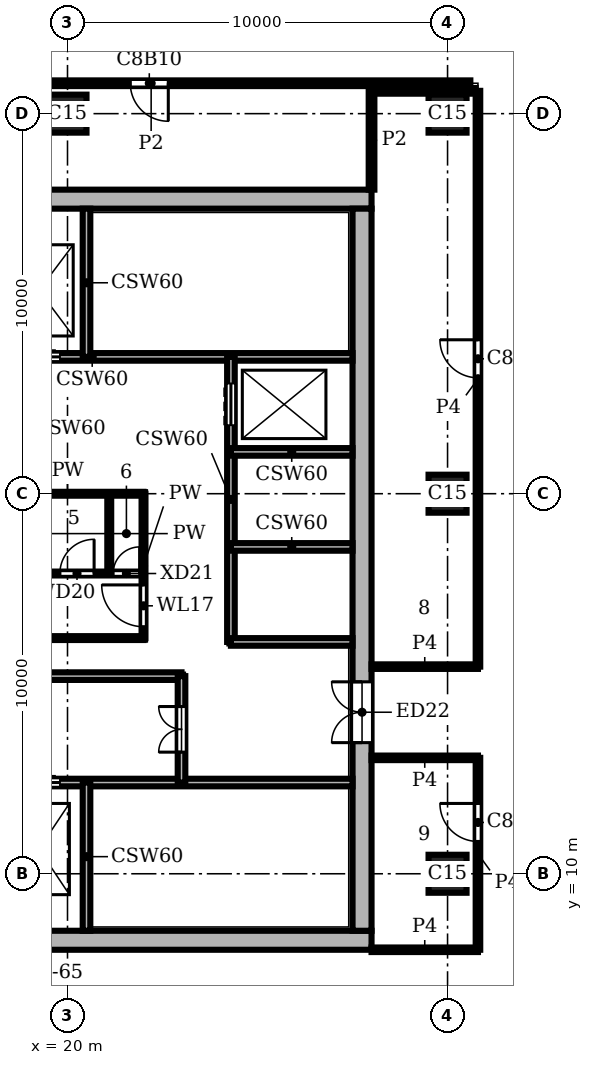
"""IFC4 building model, lengths in metres.
Left out: names, types, materials, properties, quantities, classifications, styles, units other than length and angle.
Written with IfcOpenShell. Run it as: python <this file> out.ifc"""

import sys

from ifc_helpers import new_model, si_unit, direction, frame, frame_2d, origin, origin_2d, place, context, subcontext, project, spatial, rectangle, extrude, element, fill, save


model = new_model("IFC4")
c1 = context("Model", 3, precision=1e-05, world=origin(), true_north=direction((0.0, 1.0)))
c2 = subcontext(c1, "Body", "Model", "MODEL_VIEW")
j1 = project(units=[si_unit("LENGTHUNIT", "METRE"), si_unit("PLANEANGLEUNIT", "RADIAN")], contexts=[c1])
p1 = place(None, origin())
s1 = spatial("IfcSite", under=j1, at=p1, CompositionType="ELEMENT")
p2 = place(p1, origin())
s2 = spatial("IfcBuilding", under=s1, at=p2, CompositionType="ELEMENT")
p3 = place(p2, frame((0.0, 0.0, 329.4)))
s3 = spatial("IfcBuildingStorey", under=s2, at=p3, CompositionType="ELEMENT", Elevation=329.4)
for number, where, z_axis, x_axis in (
    (1, (20.0, 30.0, 0.0), (0.0, 0.0, 1.0), (1.0, 0.0, 0.0)),
    (2, (30.0, 10.0, 0.0), (0.0, 0.0, 1.0), (1.0, 0.0, 0.0)),
    (3, (30.0, 20.0, 0.0), (0.0, 0.0, 1.0), (1.0, 0.0, 0.0)),
    (4, (30.0, 30.0, 0.0), (0.0, 0.0, 1.0), (1.0, 0.0, 0.0)),
):
    element("IfcColumn", number, at=place(p3, frame(where, z_axis=z_axis, x_axis=x_axis)), inside=s3, PredefinedType="COLUMN", context=c2, shape_type="SweptSolid", body=[
        extrude(rectangle(XDim=1.0, YDim=1.0, at=origin_2d()), origin(), (0.0, 0.0, 1.0), 3.9),
    ])
p4 = place(p3, frame((8.0, 8.25, 0.0), z_axis=(0.0, 0.0, 1.0), x_axis=(1.0, 0.0, 0.0)))
e5 = element("IfcWall", 5, at=p4, inside=s3, PredefinedType="SHEAR", context=c2, shape_type="SweptSolid", body=[
    extrude(rectangle(XDim=20.0, YDim=0.5, at=frame_2d((10.0, 0.0))), origin(), (0.0, 0.0, 1.0), 3.9),
])
p5 = place(p3, frame((27.75, 8.5, 0.0), z_axis=(0.0, 0.0, 1.0), x_axis=(0.0, 1.0, 0.0)))
e6 = element("IfcWall", 6, at=p5, inside=s3, PredefinedType="SHEAR", context=c2, shape_type="SweptSolid", body=[
    extrude(rectangle(XDim=19.0, YDim=0.5, at=frame_2d((9.5, 0.0))), origin(), (0.0, 0.0, 1.0), 3.9),
])
p6 = place(p5, frame((4.95, 0.0, 0.0)))
e7 = element("IfcOpeningElement", 7, at=p6, cuts=e6, PredefinedType="OPENING", context=c2, shape_type="SweptSolid", body=[
    extrude(rectangle(XDim=1.6, YDim=2.1, at=frame_2d((0.8, 1.05))), frame((0.0, 0.26, 0.0), z_axis=(0.0, -1.0, 0.0), x_axis=(1.0, 0.0, 0.0)), (0.0, 0.0, 1.0), 0.52),
])
p7 = place(p3, frame((28.0, 27.75, 0.0), z_axis=(0.0, 0.0, 1.0), x_axis=(-1.0, 0.0, 0.0)))
e8 = element("IfcWall", 8, at=p7, inside=s3, PredefinedType="SHEAR", context=c2, shape_type="SweptSolid", body=[
    extrude(rectangle(XDim=20.0, YDim=0.5, at=frame_2d((10.0, 0.0))), origin(), (0.0, 0.0, 1.0), 3.9),
])
p8 = place(p3, frame((13.8, 12.4, 0.0), z_axis=(0.0, 0.0, 1.0), x_axis=(1.0, 0.0, 0.0)))
e9 = element("IfcWall", 9, at=p8, inside=s3, PredefinedType="SHEAR", context=c2, shape_type="SweptSolid", body=[
    extrude(rectangle(XDim=13.7, YDim=0.2, at=frame_2d((6.85, 0.0))), origin(), (0.0, 0.0, 1.0), 3.45),
])
p9 = place(p8, frame((2.4, 0.0, 0.0)))
e10 = element("IfcOpeningElement", 10, at=p9, cuts=e9, PredefinedType="OPENING", context=c2, shape_type="SweptSolid", body=[
    extrude(rectangle(XDim=1.1, YDim=2.1, at=frame_2d((0.55, 1.05))), frame((0.0, 0.11, 0.0), z_axis=(0.0, -1.0, 0.0), x_axis=(1.0, 0.0, 0.0)), (0.0, 0.0, 1.0), 0.22),
])
p10 = place(p8, frame((4.9, 0.0, 0.0)))
e11 = element("IfcOpeningElement", 11, at=p10, cuts=e9, PredefinedType="OPENING", context=c2, shape_type="SweptSolid", body=[
    extrude(rectangle(XDim=1.1, YDim=2.1, at=frame_2d((0.55, 1.05))), frame((0.0, 0.11, 0.0), z_axis=(0.0, -1.0, 0.0), x_axis=(1.0, 0.0, 0.0)), (0.0, 0.0, 1.0), 0.22),
])
p11 = place(p8, frame((0.15, 0.0, 0.0)))
e12 = element("IfcOpeningElement", 12, at=p11, cuts=e9, PredefinedType="OPENING", context=c2, shape_type="SweptSolid", body=[
    extrude(rectangle(XDim=1.0, YDim=2.1, at=frame_2d((0.5, 1.05))), frame((0.0, 0.11, 0.0), z_axis=(0.0, -1.0, 0.0), x_axis=(1.0, 0.0, 0.0)), (0.0, 0.0, 1.0), 0.22),
])
p12 = place(p3, frame((13.3, 15.2, 0.0), z_axis=(0.0, 0.0, 1.0), x_axis=(1.0, 0.0, 0.0)))
e13 = element("IfcWall", 13, at=p12, inside=s3, PredefinedType="SHEAR", context=c2, shape_type="SweptSolid", body=[
    extrude(rectangle(XDim=9.7, YDim=0.2, at=frame_2d((4.85, 0.0))), origin(), (0.0, 0.0, 1.0), 3.45),
])
p13 = place(p3, frame((24.3, 16.1, 0.0), z_axis=(0.0, 0.0, 1.0), x_axis=(1.0, 0.0, 0.0)))
e14 = element("IfcWall", 14, at=p13, inside=s3, PredefinedType="SHEAR", context=c2, shape_type="SweptSolid", body=[
    extrude(rectangle(XDim=3.2, YDim=0.2, at=frame_2d((1.6, 0.0))), origin(), (0.0, 0.0, 1.0), 3.45),
])
p14 = place(p3, frame((14.0, 16.2, 0.0), z_axis=(0.0, 0.0, 1.0), x_axis=(1.0, 0.0, 0.0)))
e15 = element("IfcWall", 15, at=p14, inside=s3, PredefinedType="PARTITIONING", context=c2, shape_type="SweptSolid", body=[
    extrude(rectangle(XDim=8.0, YDim=0.1, at=frame_2d((4.0, 0.0))), origin(), (0.0, 0.0, 1.0), 3.45),
])
p15 = place(p3, frame((14.0, 17.9, 0.0), z_axis=(0.0, 0.0, 1.0), x_axis=(1.0, 0.0, 0.0)))
e16 = element("IfcWall", 16, at=p15, inside=s3, PredefinedType="PARTITIONING", context=c2, shape_type="SweptSolid", body=[
    extrude(rectangle(XDim=8.0, YDim=0.1, at=frame_2d((4.0, 0.0))), origin(), (0.0, 0.0, 1.0), 3.45),
])
p16 = place(p15, frame((0.85, 0.0, 0.0)))
e17 = element("IfcOpeningElement", 17, at=p16, cuts=e16, PredefinedType="OPENING", context=c2, shape_type="SweptSolid", body=[
    extrude(rectangle(XDim=0.9, YDim=2.1, at=frame_2d((0.45, 1.05))), frame((0.0, 0.06, 0.0), z_axis=(0.0, -1.0, 0.0), x_axis=(1.0, 0.0, 0.0)), (0.0, 0.0, 1.0), 0.12),
])
p17 = place(p15, frame((3.55, 0.0, 0.0)))
e18 = element("IfcOpeningElement", 18, at=p17, cuts=e16, PredefinedType="OPENING", context=c2, shape_type="SweptSolid", body=[
    extrude(rectangle(XDim=0.9, YDim=2.1, at=frame_2d((0.45, 1.05))), frame((0.0, 0.06, 0.0), z_axis=(0.0, -1.0, 0.0), x_axis=(1.0, 0.0, 0.0)), (0.0, 0.0, 1.0), 0.12),
])
p18 = place(p15, frame((5.8, 0.0, 0.0)))
e19 = element("IfcOpeningElement", 19, at=p18, cuts=e16, PredefinedType="OPENING", context=c2, shape_type="SweptSolid", body=[
    extrude(rectangle(XDim=0.9, YDim=2.1, at=frame_2d((0.45, 1.05))), frame((0.0, 0.06, 0.0), z_axis=(0.0, -1.0, 0.0), x_axis=(1.0, 0.0, 0.0)), (0.0, 0.0, 1.0), 0.12),
])
p19 = place(p15, frame((7.2, 0.0, 0.0)))
e20 = element("IfcOpeningElement", 20, at=p19, cuts=e16, PredefinedType="OPENING", context=c2, shape_type="SweptSolid", body=[
    extrude(rectangle(XDim=0.7, YDim=2.1, at=frame_2d((0.35, 1.05))), frame((0.0, 0.06, 0.0), z_axis=(0.0, -1.0, 0.0), x_axis=(1.0, 0.0, 0.0)), (0.0, 0.0, 1.0), 0.12),
])
p20 = place(p3, frame((24.3, 18.6, 0.0), z_axis=(0.0, 0.0, 1.0), x_axis=(1.0, 0.0, 0.0)))
e21 = element("IfcWall", 21, at=p20, inside=s3, PredefinedType="SHEAR", context=c2, shape_type="SweptSolid", body=[
    extrude(rectangle(XDim=3.2, YDim=0.2, at=frame_2d((1.6, 0.0))), origin(), (0.0, 0.0, 1.0), 3.45),
])
p21 = place(p3, frame((18.0, 20.0, 0.0), z_axis=(0.0, 0.0, 1.0), x_axis=(1.0, 0.0, 0.0)))
e22 = element("IfcWall", 22, at=p21, inside=s3, PredefinedType="PARTITIONING", context=c2, shape_type="SweptSolid", body=[
    extrude(rectangle(XDim=4.0, YDim=0.1, at=frame_2d((2.0, 0.0))), origin(), (0.0, 0.0, 1.0), 3.45),
])
p22 = place(p3, frame((24.3, 21.1, 0.0), z_axis=(0.0, 0.0, 1.0), x_axis=(1.0, 0.0, 0.0)))
e23 = element("IfcWall", 23, at=p22, inside=s3, PredefinedType="SHEAR", context=c2, shape_type="SweptSolid", body=[
    extrude(rectangle(XDim=3.2, YDim=0.2, at=frame_2d((1.6, 0.0))), origin(), (0.0, 0.0, 1.0), 3.45),
])
p23 = place(p3, frame((13.8, 23.6, 0.0), z_axis=(0.0, 0.0, 1.0), x_axis=(1.0, 0.0, 0.0)))
e24 = element("IfcWall", 24, at=p23, inside=s3, PredefinedType="SHEAR", context=c2, shape_type="SweptSolid", body=[
    extrude(rectangle(XDim=13.7, YDim=0.2, at=frame_2d((6.85, 0.0))), origin(), (0.0, 0.0, 1.0), 3.45),
])
p24 = place(p23, frame((2.4, 0.0, 0.0)))
e25 = element("IfcOpeningElement", 25, at=p24, cuts=e24, PredefinedType="OPENING", context=c2, shape_type="SweptSolid", body=[
    extrude(rectangle(XDim=1.1, YDim=2.1, at=frame_2d((0.55, 1.05))), frame((0.0, 0.11, 0.0), z_axis=(0.0, -1.0, 0.0), x_axis=(1.0, 0.0, 0.0)), (0.0, 0.0, 1.0), 0.22),
])
p25 = place(p23, frame((4.9, 0.0, 0.0)))
e26 = element("IfcOpeningElement", 26, at=p25, cuts=e24, PredefinedType="OPENING", context=c2, shape_type="SweptSolid", body=[
    extrude(rectangle(XDim=1.1, YDim=2.1, at=frame_2d((0.55, 1.05))), frame((0.0, 0.11, 0.0), z_axis=(0.0, -1.0, 0.0), x_axis=(1.0, 0.0, 0.0)), (0.0, 0.0, 1.0), 0.22),
])
p26 = place(p23, frame((0.15, 0.0, 0.0)))
e27 = element("IfcOpeningElement", 27, at=p26, cuts=e24, PredefinedType="OPENING", context=c2, shape_type="SweptSolid", body=[
    extrude(rectangle(XDim=1.0, YDim=2.1, at=frame_2d((0.5, 1.05))), frame((0.0, 0.11, 0.0), z_axis=(0.0, -1.0, 0.0), x_axis=(1.0, 0.0, 0.0)), (0.0, 0.0, 1.0), 0.22),
])
for number, where, z_axis, x_axis in (
    (28, (20.5, 8.5, 0.0), (0.0, 0.0, 1.0), (0.0, 1.0, 0.0)),
    (29, (20.5, 23.6, 0.0), (0.0, 0.0, 1.0), (0.0, 1.0, 0.0)),
):
    element("IfcWall", number, at=place(p3, frame(where, z_axis=z_axis, x_axis=x_axis)), inside=s3, PredefinedType="SHEAR", context=c2, shape_type="SweptSolid", body=[
        extrude(rectangle(XDim=3.9, YDim=0.2, at=frame_2d((1.95, 0.0))), origin(), (0.0, 0.0, 1.0), 3.45),
    ])
p27 = place(p3, frame((21.1, 17.9, 0.0), z_axis=(0.0, 0.0, 1.0), x_axis=(0.0, 1.0, 0.0)))
e30 = element("IfcWall", 30, at=p27, inside=s3, PredefinedType="PARTITIONING", context=c2, shape_type="SweptSolid", body=[
    extrude(rectangle(XDim=2.1, YDim=0.1, at=frame_2d((1.05, 0.0))), origin(), (0.0, 0.0, 1.0), 3.45),
])
p28 = place(p3, frame((22.0, 16.2, 0.0), z_axis=(0.0, 0.0, 1.0), x_axis=(0.0, 1.0, 0.0)))
e31 = element("IfcWall", 31, at=p28, inside=s3, PredefinedType="PARTITIONING", context=c2, shape_type="SweptSolid", body=[
    extrude(rectangle(XDim=3.8, YDim=0.1, at=frame_2d((1.9, 0.0))), origin(), (0.0, 0.0, 1.0), 3.45),
])
p29 = place(p28, frame((0.3, 0.0, 0.0)))
e32 = element("IfcOpeningElement", 32, at=p29, cuts=e31, PredefinedType="OPENING", context=c2, shape_type="SweptSolid", body=[
    extrude(rectangle(XDim=1.1, YDim=2.1, at=frame_2d((0.55, 1.05))), frame((0.0, 0.06, 0.0), z_axis=(0.0, -1.0, 0.0), x_axis=(1.0, 0.0, 0.0)), (0.0, 0.0, 1.0), 0.12),
])
p30 = place(p3, frame((23.0, 12.4, 0.0), z_axis=(0.0, 0.0, 1.0), x_axis=(0.0, 1.0, 0.0)))
e33 = element("IfcWall", 33, at=p30, inside=s3, PredefinedType="SHEAR", context=c2, shape_type="SweptSolid", body=[
    extrude(rectangle(XDim=2.8, YDim=0.2, at=frame_2d((1.4, 0.0))), origin(), (0.0, 0.0, 1.0), 3.45),
])
p31 = place(p30, frame((0.8, 0.0, 0.0)))
e34 = element("IfcOpeningElement", 34, at=p31, cuts=e33, PredefinedType="OPENING", context=c2, shape_type="SweptSolid", body=[
    extrude(rectangle(XDim=1.2, YDim=2.1, at=frame_2d((0.6, 1.05))), frame((0.0, 0.11, 0.0), z_axis=(0.0, -1.0, 0.0), x_axis=(1.0, 0.0, 0.0)), (0.0, 0.0, 1.0), 0.22),
])
p32 = place(p3, frame((24.3, 16.1, 0.0), z_axis=(0.0, 0.0, 1.0), x_axis=(0.0, 1.0, 0.0)))
e35 = element("IfcWall", 35, at=p32, inside=s3, PredefinedType="SHEAR", context=c2, shape_type="SweptSolid", body=[
    extrude(rectangle(XDim=7.5, YDim=0.2, at=frame_2d((3.75, 0.0))), origin(), (0.0, 0.0, 1.0), 3.45),
])
p33 = place(p32, frame((5.7, 0.0, 0.0)))
e36 = element("IfcOpeningElement", 36, at=p33, cuts=e35, PredefinedType="OPENING", context=c2, shape_type="SweptSolid", body=[
    extrude(rectangle(XDim=1.1, YDim=2.1, at=frame_2d((0.55, 1.05))), frame((0.0, 0.11, 0.0), z_axis=(0.0, -1.0, 0.0), x_axis=(1.0, 0.0, 0.0)), (0.0, 0.0, 1.0), 0.22),
])
p34 = place(p3, frame((28.0, 28.0, 0.0), z_axis=(0.0, 0.0, 1.0), x_axis=(0.0, 1.0, 0.0)))
e37 = element("IfcWall", 37, at=p34, inside=s3, PredefinedType="PARTITIONING", context=c2, shape_type="SweptSolid", body=[
    extrude(rectangle(XDim=2.598, YDim=0.15, at=frame_2d((1.299, 0.0))), origin(), (0.0, 0.0, 1.0), 3.45),
])
p35 = place(p3, frame((28.002, 30.6, 0.0), z_axis=(0.0, 0.0, 1.0), x_axis=(1.0, 0.0, 0.0)))
e38 = element("IfcWall", 38, at=p35, inside=s3, PredefinedType="PARTITIONING", context=c2, shape_type="SweptSolid", body=[
    extrude(rectangle(XDim=2.738, YDim=0.15, at=frame_2d((1.369, 0.0))), origin(), (0.0, 0.0, 1.0), 3.45),
])
p36 = place(p3, frame((13.802, 30.8, 0.0), z_axis=(0.0, 0.0, 1.0), x_axis=(1.0, 0.0, 0.0)))
e39 = element("IfcWall", 39, at=p36, inside=s3, PredefinedType="PARTITIONING", context=c2, shape_type="SweptSolid", body=[
    extrude(rectangle(XDim=16.798, YDim=0.15, at=frame_2d((8.399, 0.0))), origin(), (0.0, 0.0, 1.0), 3.45),
])
p37 = place(p36, frame((7.85, 0.0, 0.0)))
e40 = element("IfcOpeningElement", 40, at=p37, cuts=e39, PredefinedType="OPENING", context=c2, shape_type="SweptSolid", body=[
    extrude(rectangle(XDim=1.0, YDim=2.1, at=frame_2d((0.5, 1.05))), frame((0.0, 0.085, 0.0), z_axis=(0.0, -1.0, 0.0), x_axis=(1.0, 0.0, 0.0)), (0.0, 0.0, 1.0), 0.17),
])
p38 = place(p3, frame((30.8, 8.0, 0.0), z_axis=(0.0, 0.0, 1.0), x_axis=(0.0, 1.0, 0.0)))
e41 = element("IfcWall", 41, at=p38, inside=s3, PredefinedType="PARTITIONING", context=c2, shape_type="SweptSolid", body=[
    extrude(rectangle(XDim=5.05, YDim=0.12, at=frame_2d((2.525, 0.0))), origin(), (0.0, 0.0, 1.0), 3.45),
])
p39 = place(p38, frame((2.85, 0.0, 0.0)))
e42 = element("IfcOpeningElement", 42, at=p39, cuts=e41, PredefinedType="OPENING", context=c2, shape_type="SweptSolid", body=[
    extrude(rectangle(XDim=1.0, YDim=2.1, at=frame_2d((0.5, 1.05))), frame((0.0, 0.07, 0.0), z_axis=(0.0, -1.0, 0.0), x_axis=(1.0, 0.0, 0.0)), (0.0, 0.0, 1.0), 0.14),
])
p40 = place(p3, frame((30.8, 15.45, 0.0), z_axis=(0.0, 0.0, 1.0), x_axis=(0.0, 1.0, 0.0)))
e43 = element("IfcWall", 43, at=p40, inside=s3, PredefinedType="PARTITIONING", context=c2, shape_type="SweptSolid", body=[
    extrude(rectangle(XDim=15.15, YDim=0.12, at=frame_2d((7.575, 0.0))), origin(), (0.0, 0.0, 1.0), 3.45),
])
p41 = place(p40, frame((7.6, 0.0, 0.0)))
e44 = element("IfcOpeningElement", 44, at=p41, cuts=e43, PredefinedType="OPENING", context=c2, shape_type="SweptSolid", body=[
    extrude(rectangle(XDim=1.0, YDim=2.1, at=frame_2d((0.5, 1.05))), frame((0.0, 0.07, 0.0), z_axis=(0.0, -1.0, 0.0), x_axis=(1.0, 0.0, 0.0)), (0.0, 0.0, 1.0), 0.14),
])
for number, where, z_axis, x_axis in (
    (45, (28.0, 8.0, 0.0), (0.0, 0.0, 1.0), (1.0, 0.0, 0.0)),
    (46, (28.0, 13.05, 0.0), (0.0, 0.0, 1.0), (1.0, 0.0, 0.0)),
    (47, (28.0, 15.45, 0.0), (0.0, 0.0, 1.0), (1.0, 0.0, 0.0)),
):
    element("IfcWall", number, at=place(p3, frame(where, z_axis=z_axis, x_axis=x_axis)), inside=s3, PredefinedType="PARTITIONING", context=c2, shape_type="SweptSolid", body=[
        extrude(rectangle(XDim=2.8, YDim=0.12, at=frame_2d((1.4, 0.0))), origin(), (0.0, 0.0, 1.0), 3.45),
    ])
p42 = place(p33, origin())
e48 = element("IfcDoor", 48, at=p42, inside=s3, OperationType="DOUBLE_DOOR_SLIDING", PredefinedType="DOOR", context=c2, shape_type="SweptSolid", body=[
    extrude(rectangle(XDim=1.1, YDim=2.1, at=frame_2d((0.55, 1.05))), frame((0.0, 0.025, 0.0), z_axis=(0.0, -1.0, 0.0), x_axis=(1.0, 0.0, 0.0)), (0.0, 0.0, 1.0), 0.05),
])
fill(e36, e48)
p43 = place(p10, origin())
e49 = element("IfcDoor", 49, at=p43, inside=s3, OperationType="DOUBLE_DOOR_SLIDING", PredefinedType="DOOR", context=c2, shape_type="SweptSolid", body=[
    extrude(rectangle(XDim=1.1, YDim=2.1, at=frame_2d((0.55, 1.05))), frame((0.0, 0.025, 0.0), z_axis=(0.0, -1.0, 0.0), x_axis=(1.0, 0.0, 0.0)), (0.0, 0.0, 1.0), 0.05),
])
fill(e11, e49)
p44 = place(p25, origin())
e50 = element("IfcDoor", 50, at=p44, inside=s3, OperationType="DOUBLE_DOOR_SLIDING", PredefinedType="DOOR", context=c2, shape_type="SweptSolid", body=[
    extrude(rectangle(XDim=1.1, YDim=2.1, at=frame_2d((0.55, 1.05))), frame((0.0, 0.025, 0.0), z_axis=(0.0, -1.0, 0.0), x_axis=(1.0, 0.0, 0.0)), (0.0, 0.0, 1.0), 0.05),
])
fill(e26, e50)
p45 = place(p31, origin())
e51 = element("IfcDoor", 51, at=p45, inside=s3, OperationType="DOUBLE_DOOR_SINGLE_SWING", PredefinedType="DOOR", context=c2, shape_type="SweptSolid", body=[
    extrude(rectangle(XDim=1.2, YDim=2.1, at=frame_2d((0.6, 1.05))), frame((0.0, 0.025, 0.0), z_axis=(0.0, -1.0, 0.0), x_axis=(1.0, 0.0, 0.0)), (0.0, 0.0, 1.0), 0.05),
])
fill(e34, e51)
p46 = place(p29, origin())
e52 = element("IfcDoor", 52, at=p46, inside=s3, OperationType="SINGLE_SWING_RIGHT", PredefinedType="DOOR", context=c2, shape_type="SweptSolid", body=[
    extrude(rectangle(XDim=1.1, YDim=2.1, at=frame_2d((0.55, 1.05))), frame((0.0, 0.025, 0.0), z_axis=(0.0, -1.0, 0.0), x_axis=(1.0, 0.0, 0.0)), (0.0, 0.0, 1.0), 0.05),
])
fill(e32, e52)
p47 = place(p18, origin())
e53 = element("IfcDoor", 53, at=p47, inside=s3, OperationType="SINGLE_SWING_RIGHT", PredefinedType="DOOR", context=c2, shape_type="SweptSolid", body=[
    extrude(rectangle(XDim=0.9, YDim=2.1, at=frame_2d((0.45, 1.05))), frame((0.0, 0.025, 0.0), z_axis=(0.0, -1.0, 0.0), x_axis=(1.0, 0.0, 0.0)), (0.0, 0.0, 1.0), 0.05),
])
fill(e19, e53)
p48 = place(p19, origin())
e54 = element("IfcDoor", 54, at=p48, inside=s3, OperationType="SINGLE_SWING_RIGHT", PredefinedType="DOOR", context=c2, shape_type="SweptSolid", body=[
    extrude(rectangle(XDim=0.7, YDim=2.1, at=frame_2d((0.35, 1.05))), frame((0.0, 0.025, 0.0), z_axis=(0.0, -1.0, 0.0), x_axis=(1.0, 0.0, 0.0)), (0.0, 0.0, 1.0), 0.05),
])
fill(e20, e54)
p49 = place(p6, origin())
e55 = element("IfcDoor", 55, at=p49, inside=s3, OperationType="DOUBLE_DOOR_SINGLE_SWING", PredefinedType="DOOR", context=c2, shape_type="SweptSolid", body=[
    extrude(rectangle(XDim=1.6, YDim=2.1, at=frame_2d((0.8, 1.05))), frame((0.0, 0.025, 0.0), z_axis=(0.0, -1.0, 0.0), x_axis=(1.0, 0.0, 0.0)), (0.0, 0.0, 1.0), 0.05),
])
fill(e7, e55)
p50 = place(p41, origin())
e56 = element("IfcDoor", 56, at=p50, inside=s3, OperationType="SINGLE_SWING_RIGHT", PredefinedType="DOOR", context=c2, shape_type="SweptSolid", body=[
    extrude(rectangle(XDim=1.0, YDim=2.1, at=frame_2d((0.5, 1.05))), frame((0.0, 0.025, 0.0), z_axis=(0.0, -1.0, 0.0), x_axis=(1.0, 0.0, 0.0)), (0.0, 0.0, 1.0), 0.05),
])
fill(e44, e56)
p51 = place(p39, origin())
e57 = element("IfcDoor", 57, at=p51, inside=s3, OperationType="SINGLE_SWING_RIGHT", PredefinedType="DOOR", context=c2, shape_type="SweptSolid", body=[
    extrude(rectangle(XDim=1.0, YDim=2.1, at=frame_2d((0.5, 1.05))), frame((0.0, 0.025, 0.0), z_axis=(0.0, -1.0, 0.0), x_axis=(1.0, 0.0, 0.0)), (0.0, 0.0, 1.0), 0.05),
])
fill(e42, e57)
p52 = place(p37, frame((1.0, 0.0, 0.0), z_axis=(0.0, 0.0, 1.0), x_axis=(-1.0, 0.0, 0.0)))
e58 = element("IfcDoor", 58, at=p52, inside=s3, OperationType="SINGLE_SWING_LEFT", PredefinedType="DOOR", context=c2, shape_type="SweptSolid", body=[
    extrude(rectangle(XDim=1.0, YDim=2.1, at=frame_2d((0.5, 1.05))), frame((0.0, 0.025, 0.0), z_axis=(0.0, -1.0, 0.0), x_axis=(1.0, 0.0, 0.0)), (0.0, 0.0, 1.0), 0.05),
])
fill(e40, e58)
save(model, sys.argv[1])
